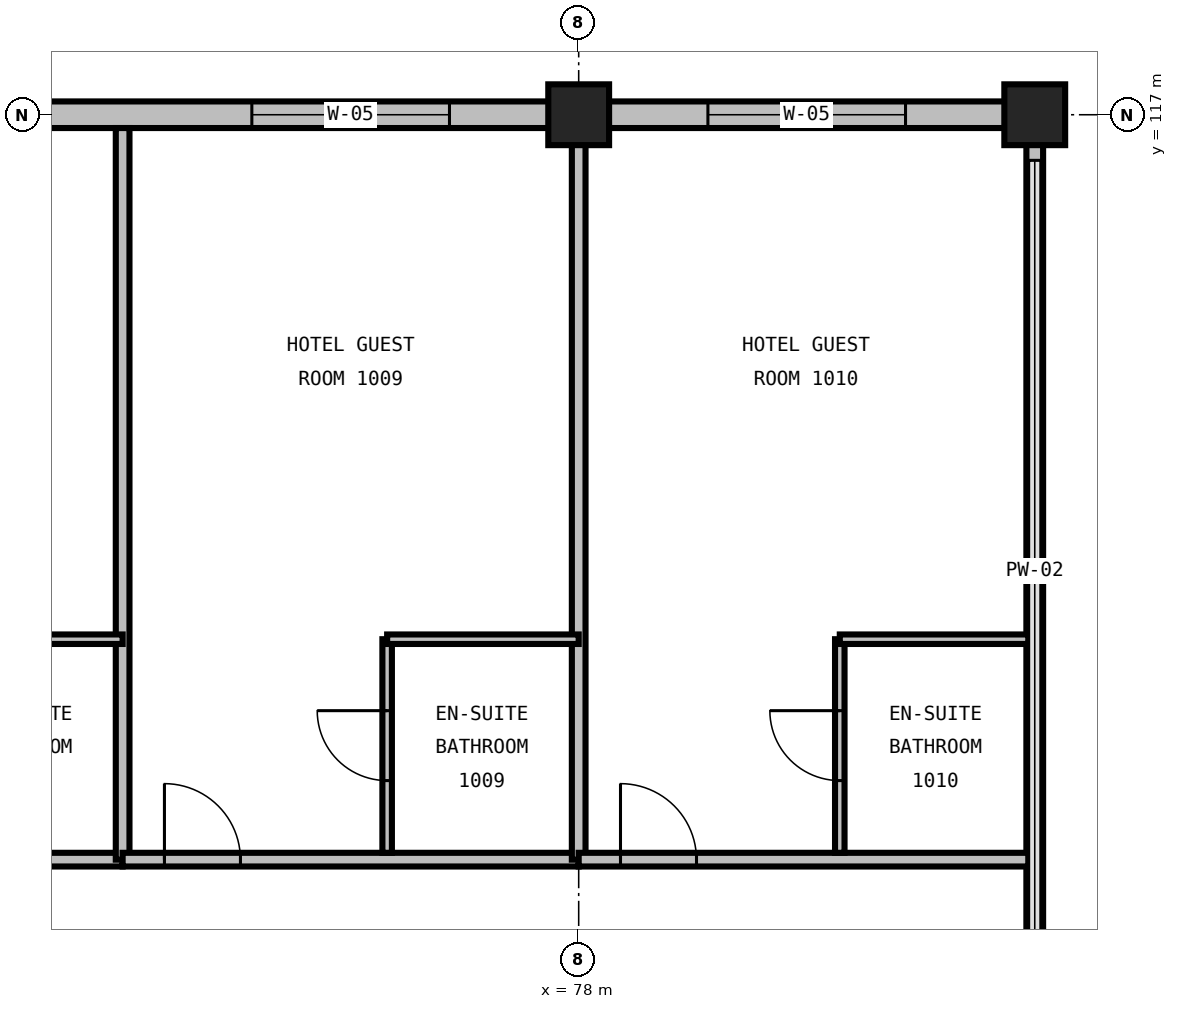
"""IFC4 building model, lengths in metres.
Left out: names, types, materials, properties, quantities, classifications, styles, units other than length and angle.
Written with IfcOpenShell. Run it as: python <this file> out.ifc"""

import sys

from ifc_helpers import new_model, si_unit, direction, frame, frame_2d, origin, origin_2d, place, context, subcontext, project, spatial, rectangle, extrude, element, fill, save


model = new_model("IFC4")
c1 = context("Model", 3, precision=1e-05, world=origin(), true_north=direction((0.0, 1.0)))
c2 = subcontext(c1, "Body", "Model", "MODEL_VIEW")
j1 = project(units=[si_unit("LENGTHUNIT", "METRE"), si_unit("PLANEANGLEUNIT", "RADIAN")], contexts=[c1])
p1 = place(None, origin())
s1 = spatial("IfcSite", under=j1, at=p1, CompositionType="ELEMENT")
p2 = place(p1, origin())
s2 = spatial("IfcBuilding", under=s1, at=p2, CompositionType="ELEMENT")
p3 = place(p2, frame((0.0, 0.0, 45.6)))
s3 = spatial("IfcBuildingStorey", under=s2, at=p3, CompositionType="ELEMENT", Elevation=45.6)
for number, where, z_axis, x_axis in (
    (1, (78.0, 117.0, 0.0), (0.0, 0.0, 1.0), (1.0, 0.0, 0.0)),
    (2, (84.0, 117.0, 0.0), (0.0, 0.0, 1.0), (1.0, 0.0, 0.0)),
):
    element("IfcColumn", number, at=place(p3, frame(where, z_axis=z_axis, x_axis=x_axis)), inside=s3, PredefinedType="COLUMN", context=c2, shape_type="SweptSolid", body=[
        extrude(rectangle(XDim=0.8, YDim=0.8, at=origin_2d()), origin(), (0.0, 0.0, 1.0), 3.6),
    ])
p4 = place(p3, frame((78.0, 117.0, 0.0), z_axis=(0.0, 0.0, 1.0), x_axis=(-1.0, 0.0, 0.0)))
e3 = element("IfcWall", 3, at=p4, inside=s3, PredefinedType="STANDARD", context=c2, shape_type="SweptSolid", body=[
    extrude(rectangle(XDim=12.0, YDim=0.35, at=frame_2d((6.0, 0.0))), origin(), (0.0, 0.0, 1.0), 2.486),
])
p5 = place(p4, frame((1.7, 0.0, 0.72)))
e4 = element("IfcOpeningElement", 4, at=p5, cuts=e3, PredefinedType="OPENING", context=c2, shape_type="SweptSolid", body=[
    extrude(rectangle(XDim=2.6, YDim=1.69, at=frame_2d((1.3, 0.845))), frame((0.0, 0.19, 0.0), z_axis=(0.0, -1.0, 0.0), x_axis=(1.0, 0.0, 0.0)), (0.0, 0.0, 1.0), 0.38),
])
p6 = place(p4, frame((7.625, 0.0, 0.72)))
e5 = element("IfcOpeningElement", 5, at=p6, cuts=e3, PredefinedType="OPENING", context=c2, shape_type="SweptSolid", body=[
    extrude(rectangle(XDim=2.75, YDim=1.69, at=frame_2d((1.375, 0.845))), frame((0.0, 0.19, 0.0), z_axis=(0.0, -1.0, 0.0), x_axis=(1.0, 0.0, 0.0)), (0.0, 0.0, 1.0), 0.38),
])
p7 = place(p3, frame((84.0, 117.0, 0.0), z_axis=(0.0, 0.0, 1.0), x_axis=(-1.0, 0.0, 0.0)))
e6 = element("IfcWall", 6, at=p7, inside=s3, PredefinedType="STANDARD", context=c2, shape_type="SweptSolid", body=[
    extrude(rectangle(XDim=6.0, YDim=0.35, at=frame_2d((3.0, 0.0))), origin(), (0.0, 0.0, 1.0), 2.486),
])
p8 = place(p7, frame((1.7, 0.0, 0.72)))
e7 = element("IfcOpeningElement", 7, at=p8, cuts=e6, PredefinedType="OPENING", context=c2, shape_type="SweptSolid", body=[
    extrude(rectangle(XDim=2.6, YDim=1.69, at=frame_2d((1.3, 0.845))), frame((0.0, 0.19, 0.0), z_axis=(0.0, -1.0, 0.0), x_axis=(1.0, 0.0, 0.0)), (0.0, 0.0, 1.0), 0.38),
])
p9 = place(p3, frame((84.0, 105.0, 0.0), z_axis=(0.0, 0.0, 1.0), x_axis=(0.0, 1.0, 0.0)))
e8 = element("IfcWall", 8, at=p9, inside=s3, PredefinedType="PARAPET", context=c2, shape_type="SweptSolid", body=[
    extrude(rectangle(XDim=12.0, YDim=0.22, at=frame_2d((6.0, 0.0))), origin(), (0.0, 0.0, 1.0), 0.2),
])
p10 = place(p3, frame((66.0, 107.2, 0.0), z_axis=(0.0, 0.0, 1.0), x_axis=(1.0, 0.0, 0.0)))
e9 = element("IfcWall", 9, at=p10, inside=s3, PredefinedType="PARTITIONING", context=c2, shape_type="SweptSolid", body=[
    extrude(rectangle(XDim=6.0, YDim=0.18, at=frame_2d((3.0, 0.0))), origin(), (0.0, 0.0, 1.0), 3.29),
])
p11 = place(p10, frame((0.55, 0.0, 0.0)))
e10 = element("IfcOpeningElement", 10, at=p11, cuts=e9, PredefinedType="OPENING", context=c2, shape_type="SweptSolid", body=[
    extrude(rectangle(XDim=1.0, YDim=2.15, at=frame_2d((0.5, 1.075))), frame((0.0, 0.105, 0.0), z_axis=(0.0, -1.0, 0.0), x_axis=(1.0, 0.0, 0.0)), (0.0, 0.0, 1.0), 0.21),
])
p12 = place(p3, frame((72.0, 107.2, 0.0), z_axis=(0.0, 0.0, 1.0), x_axis=(0.0, 1.0, 0.0)))
e11 = element("IfcWall", 11, at=p12, inside=s3, PredefinedType="PARTITIONING", context=c2, shape_type="SweptSolid", body=[
    extrude(rectangle(XDim=9.625, YDim=0.18, at=frame_2d((4.812, 0.0))), origin(), (0.0, 0.0, 1.0), 3.29),
])
p13 = place(p3, frame((69.48, 110.1, 0.0), z_axis=(0.0, 0.0, 1.0), x_axis=(1.0, 0.0, 0.0)))
e12 = element("IfcWall", 12, at=p13, inside=s3, PredefinedType="PARTITIONING", context=c2, shape_type="SweptSolid", body=[
    extrude(rectangle(XDim=2.52, YDim=0.125, at=frame_2d((1.26, 0.0))), origin(), (0.0, 0.0, 1.0), 3.29),
])
p14 = place(p3, frame((72.0, 107.2, 0.0), z_axis=(0.0, 0.0, 1.0), x_axis=(1.0, 0.0, 0.0)))
e13 = element("IfcWall", 13, at=p14, inside=s3, PredefinedType="PARTITIONING", context=c2, shape_type="SweptSolid", body=[
    extrude(rectangle(XDim=6.0, YDim=0.18, at=frame_2d((3.0, 0.0))), origin(), (0.0, 0.0, 1.0), 3.29),
])
p15 = place(p14, frame((0.55, 0.0, 0.0)))
e14 = element("IfcOpeningElement", 14, at=p15, cuts=e13, PredefinedType="OPENING", context=c2, shape_type="SweptSolid", body=[
    extrude(rectangle(XDim=1.0, YDim=2.15, at=frame_2d((0.5, 1.075))), frame((0.0, 0.105, 0.0), z_axis=(0.0, -1.0, 0.0), x_axis=(1.0, 0.0, 0.0)), (0.0, 0.0, 1.0), 0.21),
])
p16 = place(p3, frame((78.0, 107.2, 0.0), z_axis=(0.0, 0.0, 1.0), x_axis=(0.0, 1.0, 0.0)))
e15 = element("IfcWall", 15, at=p16, inside=s3, PredefinedType="PARTITIONING", context=c2, shape_type="SweptSolid", body=[
    extrude(rectangle(XDim=9.625, YDim=0.18, at=frame_2d((4.812, 0.0))), origin(), (0.0, 0.0, 1.0), 2.59),
])
p17 = place(p3, frame((75.48, 107.29, 0.0), z_axis=(0.0, 0.0, 1.0), x_axis=(0.0, 1.0, 0.0)))
e16 = element("IfcWall", 16, at=p17, inside=s3, PredefinedType="PARTITIONING", context=c2, shape_type="SweptSolid", body=[
    extrude(rectangle(XDim=2.81, YDim=0.125, at=frame_2d((1.405, 0.0))), origin(), (0.0, 0.0, 1.0), 3.29),
])
p18 = place(p17, frame((0.95, 0.0, 0.0)))
e17 = element("IfcOpeningElement", 17, at=p18, cuts=e16, PredefinedType="OPENING", context=c2, shape_type="SweptSolid", body=[
    extrude(rectangle(XDim=0.92, YDim=2.1, at=frame_2d((0.46, 1.05))), frame((0.0, 0.077, 0.0), z_axis=(0.0, -1.0, 0.0), x_axis=(1.0, 0.0, 0.0)), (0.0, 0.0, 1.0), 0.155),
])
p19 = place(p3, frame((75.48, 110.1, 0.0), z_axis=(0.0, 0.0, 1.0), x_axis=(1.0, 0.0, 0.0)))
e18 = element("IfcWall", 18, at=p19, inside=s3, PredefinedType="PARTITIONING", context=c2, shape_type="SweptSolid", body=[
    extrude(rectangle(XDim=2.52, YDim=0.125, at=frame_2d((1.26, 0.0))), origin(), (0.0, 0.0, 1.0), 3.29),
])
p20 = place(p3, frame((78.0, 107.2, 0.0), z_axis=(0.0, 0.0, 1.0), x_axis=(1.0, 0.0, 0.0)))
e19 = element("IfcWall", 19, at=p20, inside=s3, PredefinedType="PARTITIONING", context=c2, shape_type="SweptSolid", body=[
    extrude(rectangle(XDim=5.915, YDim=0.18, at=frame_2d((2.957, 0.0))), origin(), (0.0, 0.0, 1.0), 3.29),
])
p21 = place(p20, frame((0.55, 0.0, 0.0)))
e20 = element("IfcOpeningElement", 20, at=p21, cuts=e19, PredefinedType="OPENING", context=c2, shape_type="SweptSolid", body=[
    extrude(rectangle(XDim=1.0, YDim=2.15, at=frame_2d((0.5, 1.075))), frame((0.0, 0.105, 0.0), z_axis=(0.0, -1.0, 0.0), x_axis=(1.0, 0.0, 0.0)), (0.0, 0.0, 1.0), 0.21),
])
p22 = place(p3, frame((81.435, 107.29, 0.0), z_axis=(0.0, 0.0, 1.0), x_axis=(0.0, 1.0, 0.0)))
e21 = element("IfcWall", 21, at=p22, inside=s3, PredefinedType="PARTITIONING", context=c2, shape_type="SweptSolid", body=[
    extrude(rectangle(XDim=2.81, YDim=0.125, at=frame_2d((1.405, 0.0))), origin(), (0.0, 0.0, 1.0), 3.29),
])
p23 = place(p22, frame((0.95, 0.0, 0.0)))
e22 = element("IfcOpeningElement", 22, at=p23, cuts=e21, PredefinedType="OPENING", context=c2, shape_type="SweptSolid", body=[
    extrude(rectangle(XDim=0.92, YDim=2.1, at=frame_2d((0.46, 1.05))), frame((0.0, 0.077, 0.0), z_axis=(0.0, -1.0, 0.0), x_axis=(1.0, 0.0, 0.0)), (0.0, 0.0, 1.0), 0.155),
])
p24 = place(p3, frame((81.435, 110.1, 0.0), z_axis=(0.0, 0.0, 1.0), x_axis=(1.0, 0.0, 0.0)))
e23 = element("IfcWall", 23, at=p24, inside=s3, PredefinedType="PARTITIONING", context=c2, shape_type="SweptSolid", body=[
    extrude(rectangle(XDim=2.48, YDim=0.125, at=frame_2d((1.24, 0.0))), origin(), (0.0, 0.0, 1.0), 3.29),
])
p25 = place(p5, origin())
e24 = element("IfcWindow", 24, at=p25, inside=s3, PartitioningType="DOUBLE_PANEL_VERTICAL", PredefinedType="WINDOW", context=c2, shape_type="SweptSolid", body=[
    extrude(rectangle(XDim=2.6, YDim=1.69, at=frame_2d((1.3, 0.845))), frame((0.0, 0.03, 0.0), z_axis=(0.0, -1.0, 0.0), x_axis=(1.0, 0.0, 0.0)), (0.0, 0.0, 1.0), 0.06),
])
fill(e4, e24)
p26 = place(p8, origin())
e25 = element("IfcWindow", 25, at=p26, inside=s3, PartitioningType="DOUBLE_PANEL_VERTICAL", PredefinedType="WINDOW", context=c2, shape_type="SweptSolid", body=[
    extrude(rectangle(XDim=2.6, YDim=1.69, at=frame_2d((1.3, 0.845))), frame((0.0, 0.03, 0.0), z_axis=(0.0, -1.0, 0.0), x_axis=(1.0, 0.0, 0.0)), (0.0, 0.0, 1.0), 0.06),
])
fill(e7, e25)
p27 = place(p15, origin())
e26 = element("IfcDoor", 26, at=p27, inside=s3, OperationType="SINGLE_SWING_LEFT", PredefinedType="DOOR", context=c2, shape_type="SweptSolid", body=[
    extrude(rectangle(XDim=1.0, YDim=2.15, at=frame_2d((0.5, 1.075))), frame((0.0, 0.025, 0.0), z_axis=(0.0, -1.0, 0.0), x_axis=(1.0, 0.0, 0.0)), (0.0, 0.0, 1.0), 0.05),
])
fill(e14, e26)
p28 = place(p18, origin())
e27 = element("IfcDoor", 27, at=p28, inside=s3, OperationType="SINGLE_SWING_RIGHT", PredefinedType="DOOR", context=c2, shape_type="SweptSolid", body=[
    extrude(rectangle(XDim=0.92, YDim=2.1, at=frame_2d((0.46, 1.05))), frame((0.0, 0.025, 0.0), z_axis=(0.0, -1.0, 0.0), x_axis=(1.0, 0.0, 0.0)), (0.0, 0.0, 1.0), 0.05),
])
fill(e17, e27)
p29 = place(p21, origin())
e28 = element("IfcDoor", 28, at=p29, inside=s3, OperationType="SINGLE_SWING_LEFT", PredefinedType="DOOR", context=c2, shape_type="SweptSolid", body=[
    extrude(rectangle(XDim=1.0, YDim=2.15, at=frame_2d((0.5, 1.075))), frame((0.0, 0.025, 0.0), z_axis=(0.0, -1.0, 0.0), x_axis=(1.0, 0.0, 0.0)), (0.0, 0.0, 1.0), 0.05),
])
fill(e20, e28)
p30 = place(p23, origin())
e29 = element("IfcDoor", 29, at=p30, inside=s3, OperationType="SINGLE_SWING_RIGHT", PredefinedType="DOOR", context=c2, shape_type="SweptSolid", body=[
    extrude(rectangle(XDim=0.92, YDim=2.1, at=frame_2d((0.46, 1.05))), frame((0.0, 0.025, 0.0), z_axis=(0.0, -1.0, 0.0), x_axis=(1.0, 0.0, 0.0)), (0.0, 0.0, 1.0), 0.05),
])
fill(e22, e29)
save(model, sys.argv[1])
